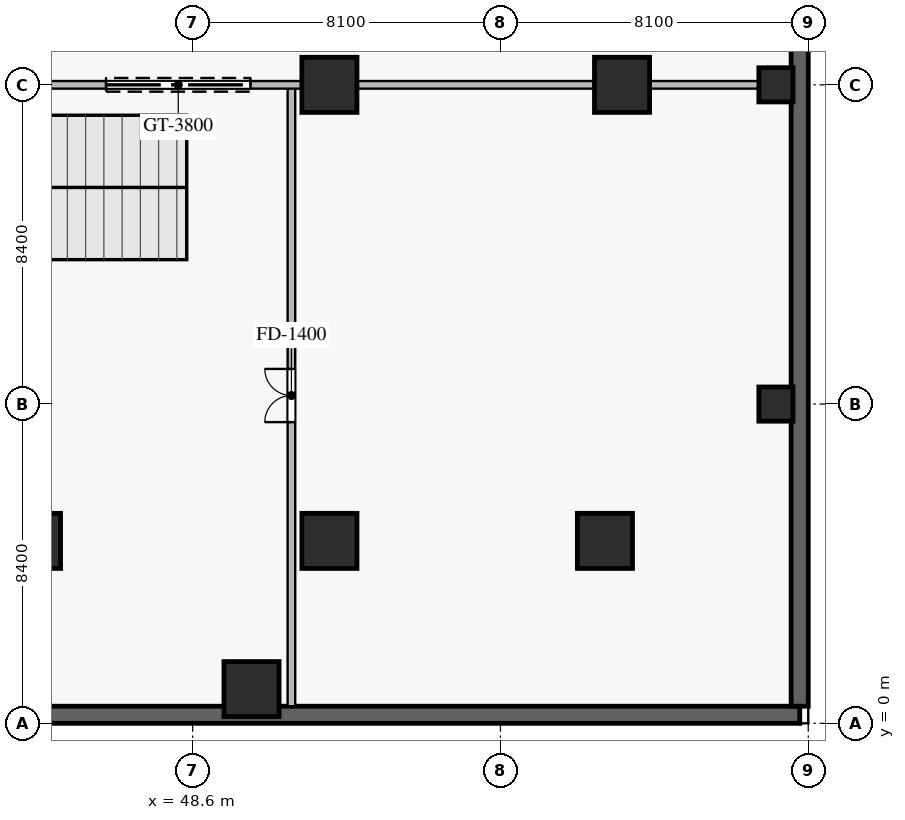
"""IFC4 building model, lengths in metres.
Left out: names, types, materials, properties, quantities, classifications, styles, units other than length and angle.
Written with IfcOpenShell. Run it as: python <this file> out.ifc"""

import sys

from ifc_helpers import new_model, si_unit, direction, frame, frame_2d, origin, origin_2d, place, context, subcontext, project, spatial, rectangle, extrude, source, transform, mapped, element, fill, save


model = new_model("IFC4")
c1 = context("Model", 3, precision=1e-05, world=origin(), true_north=direction((0.0, 1.0)))
c2 = subcontext(c1, "Body", "Model", "MODEL_VIEW")
j1 = project(units=[si_unit("LENGTHUNIT", "METRE"), si_unit("PLANEANGLEUNIT", "RADIAN")], contexts=[c1])
p1 = place(None, origin())
s1 = spatial("IfcSite", under=j1, at=p1, CompositionType="ELEMENT")
p2 = place(p1, origin())
s2 = spatial("IfcBuilding", under=s1, at=p2, CompositionType="ELEMENT")
p3 = place(p2, frame((0.0, 0.0, -10.8)))
s3 = spatial("IfcBuildingStorey", under=s2, at=p3, CompositionType="ELEMENT", Elevation=-10.8)
p4 = place(p3, frame((0.225, 0.225, 0.0), z_axis=(0.0, 0.0, 1.0), x_axis=(1.0, 0.0, 0.0)))
e1 = element("IfcWall", 1, at=p4, inside=s3, PredefinedType="USERDEFINED", context=c2, shape_type="SweptSolid", body=[
    extrude(rectangle(XDim=64.35, YDim=0.45, at=frame_2d((32.175, 0.0))), origin(), (0.0, 0.0, 1.0), 3.238),
])
p5 = place(p3, frame((64.575, 0.45, 0.0), z_axis=(0.0, 0.0, 1.0), x_axis=(0.0, 1.0, 0.0)))
e2 = element("IfcWall", 2, at=p5, inside=s3, PredefinedType="USERDEFINED", context=c2, shape_type="SweptSolid", body=[
    extrude(rectangle(XDim=49.5, YDim=0.45, at=frame_2d((24.75, 0.0))), origin(), (0.0, 0.0, 1.0), 3.238),
])
m1 = source(origin(), c2, "Body", "SweptSolid", [
    extrude(rectangle(XDim=0.9, YDim=0.9, at=origin_2d()), origin(), (0.0, 0.0, 1.0), 3.24),
])
for number, where, z_axis, x_axis in (
    (3, (63.95, 8.4, 0.0), (0.0, 0.0, 1.0), (1.0, 0.0, 0.0)),
    (4, (63.95, 16.8, 0.0), (0.0, 0.0, 1.0), (1.0, 0.0, 0.0)),
):
    element("IfcColumn", number, at=place(p3, frame(where, z_axis=z_axis, x_axis=x_axis)), inside=s3, PredefinedType="COLUMN", context=c2, shape_type="MappedRepresentation", body=[
        mapped(m1, transform((0.0, 0.0, 0.0), scale=1.0)),
    ])
m2 = source(origin(), c2, "Body", "SweptSolid", [
    extrude(rectangle(XDim=1.45, YDim=1.45, at=origin_2d()), origin(), (0.0, 0.0, 1.0), 3.24),
])
for number, where, z_axis, x_axis in (
    (5, (44.4, 4.8, 0.0), (0.0, 0.0, 1.0), (1.0, 0.0, 0.0)),
    (6, (52.2, 4.8, 0.0), (0.0, 0.0, 1.0), (1.0, 0.0, 0.0)),
    (7, (52.2, 16.8, 0.0), (0.0, 0.0, 1.0), (1.0, 0.0, 0.0)),
    (8, (50.15, 0.9, 0.0), (0.0, 0.0, 1.0), (1.0, 0.0, 0.0)),
    (9, (59.9, 16.8, 0.0), (0.0, 0.0, 1.0), (1.0, 0.0, 0.0)),
    (10, (59.45, 4.8, 0.0), (0.0, 0.0, 1.0), (1.0, 0.0, 0.0)),
):
    element("IfcColumn", number, at=place(p3, frame(where, z_axis=z_axis, x_axis=x_axis)), inside=s3, PredefinedType="COLUMN", context=c2, shape_type="MappedRepresentation", body=[
        mapped(m2, transform((0.0, 0.0, 0.0), scale=1.0)),
    ])
p6 = place(p3, frame((51.2, 0.45, 0.0), z_axis=(0.0, 0.0, 1.0), x_axis=(0.0, 1.0, 0.0)))
e11 = element("IfcWall", 11, at=p6, inside=s3, PredefinedType="STANDARD", context=c2, shape_type="SweptSolid", body=[
    extrude(rectangle(XDim=16.35, YDim=0.2, at=frame_2d((8.175, 0.0))), origin(), (0.0, 0.0, 1.0), 3.24),
])
p7 = place(p6, frame((7.475, 0.0, 0.0)))
e12 = element("IfcOpeningElement", 12, at=p7, cuts=e11, PredefinedType="OPENING", context=c2, shape_type="SweptSolid", body=[
    extrude(rectangle(XDim=1.4, YDim=2.2, at=frame_2d((0.7, 1.1))), frame((0.0, 0.11, 0.0), z_axis=(0.0, -1.0, 0.0), x_axis=(1.0, 0.0, 0.0)), (0.0, 0.0, 1.0), 0.22),
])
p8 = place(p3, frame((41.625, 16.8, 0.0), z_axis=(0.0, 0.0, 1.0), x_axis=(1.0, 0.0, 0.0)))
e13 = element("IfcWall", 13, at=p8, inside=s3, PredefinedType="STANDARD", context=c2, shape_type="SweptSolid", body=[
    extrude(rectangle(XDim=22.725, YDim=0.2, at=frame_2d((11.363, 0.0))), origin(), (0.0, 0.0, 1.0), 2.672),
])
p9 = place(p8, frame((4.697, 0.0, 0.0)))
e14 = element("IfcOpeningElement", 14, at=p9, cuts=e13, PredefinedType="OPENING", context=c2, shape_type="SweptSolid", body=[
    extrude(rectangle(XDim=3.8, YDim=2.5, at=frame_2d((1.9, 1.25))), frame((0.0, 0.11, 0.0), z_axis=(0.0, -1.0, 0.0), x_axis=(1.0, 0.0, 0.0)), (0.0, 0.0, 1.0), 0.22),
])
m3 = source(origin(), c2, "Body", "SweptSolid", [
    extrude(rectangle(XDim=1.4, YDim=2.2, at=frame_2d((0.7, 1.1))), frame((0.0, 0.025, 0.0), z_axis=(0.0, -1.0, 0.0), x_axis=(1.0, 0.0, 0.0)), (0.0, 0.0, 1.0), 0.05),
])
p10 = place(p7, origin())
e15 = element("IfcDoor", 15, at=p10, inside=s3, OperationType="DOUBLE_DOOR_SINGLE_SWING", PredefinedType="DOOR", context=c2, shape_type="MappedRepresentation", body=[
    mapped(m3, transform((0.0, 0.0, 0.0), scale=1.0)),
])
fill(e12, e15)
m4 = source(origin(), c2, "Body", "SweptSolid", [
    extrude(rectangle(XDim=3.8, YDim=2.5, at=frame_2d((1.9, 1.25))), frame((0.0, 0.025, 0.0), z_axis=(0.0, -1.0, 0.0), x_axis=(1.0, 0.0, 0.0)), (0.0, 0.0, 1.0), 0.05),
])
p11 = place(p9, origin())
e16 = element("IfcDoor", 16, at=p11, inside=s3, OperationType="ROLLINGUP", PredefinedType="GATE", context=c2, shape_type="MappedRepresentation", body=[
    mapped(m4, transform((0.0, 0.0, 0.0), scale=1.0)),
])
fill(e14, e16)
save(model, sys.argv[1])
